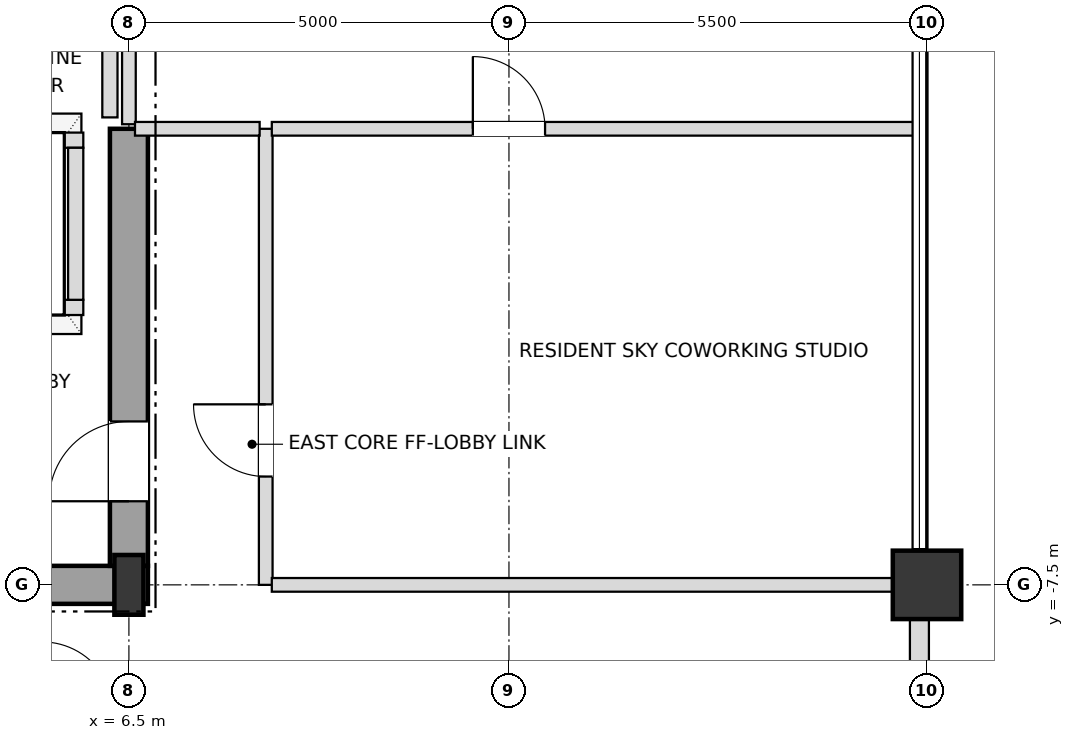
"""IFC4 building model, lengths in metres.
Left out: names, types, materials, properties, quantities, classifications, styles, units other than length and angle.
Written with IfcOpenShell. Run it as: python <this file> out.ifc"""

import sys

from ifc_helpers import new_model, si_unit, direction, frame, frame_2d, origin, origin_2d, place, context, subcontext, project, spatial, rectangle, i_section, extrude, element, fill, save


model = new_model("IFC4")
c1 = context("Model", 3, precision=1e-05, world=origin(), true_north=direction((0.0, 1.0)))
c2 = subcontext(c1, "Body", "Model", "MODEL_VIEW")
j1 = project(units=[si_unit("LENGTHUNIT", "METRE"), si_unit("PLANEANGLEUNIT", "RADIAN")], contexts=[c1])
p1 = place(None, origin())
s1 = spatial("IfcSite", under=j1, at=p1, CompositionType="ELEMENT")
p2 = place(p1, origin())
s2 = spatial("IfcBuilding", under=s1, at=p2, CompositionType="ELEMENT")
p3 = place(p2, frame((0.0, 0.0, 297.9)))
s3 = spatial("IfcBuildingStorey", under=s2, at=p3, CompositionType="ELEMENT", Elevation=297.9)
p4 = place(p3, frame((6.5, -7.5, 0.0), z_axis=(0.0, 0.0, 1.0), x_axis=(1.0, 0.0, 0.0)))
e1 = element("IfcColumn", 1, at=p4, inside=s3, PredefinedType="COLUMN", context=c2, shape_type="SweptSolid", body=[
    extrude(i_section(OverallWidth=0.382, OverallDepth=0.786, WebThickness=0.02, FlangeThickness=0.033, at=origin_2d()), origin(), (0.0, 0.0, 1.0), 3.6),
])
p5 = place(p3, frame((17.0, -7.5, 0.0), z_axis=(0.0, 0.0, 1.0), x_axis=(1.0, 0.0, 0.0)))
e2 = element("IfcColumn", 2, at=p5, inside=s3, PredefinedType="USERDEFINED", context=c2, shape_type="SweptSolid", body=[
    extrude(rectangle(XDim=0.9, YDim=0.9, at=origin_2d()), origin(), (0.0, 0.0, 1.0), 3.6),
])
p6 = place(p3, frame((16.9, -12.555, 0.0), z_axis=(0.0, 0.0, 1.0), x_axis=(0.0, 1.0, 0.0)))
e3 = element("IfcWall", 3, at=p6, inside=s3, PredefinedType="SOLIDWALL", context=c2, shape_type="SweptSolid", body=[
    extrude(rectangle(XDim=4.61, YDim=0.25, at=frame_2d((2.305, 0.0))), origin(), (0.0, 0.0, 1.0), 2.748),
])
p7 = place(p6, frame((1.405, 0.0, 0.72)))
e4 = element("IfcOpeningElement", 4, at=p7, cuts=e3, PredefinedType="OPENING", context=c2, shape_type="SweptSolid", body=[
    extrude(rectangle(XDim=1.8, YDim=1.68, at=frame_2d((0.9, 0.84))), frame((0.0, 0.135, 0.0), z_axis=(0.0, -1.0, 0.0), x_axis=(1.0, 0.0, 0.0)), (0.0, 0.0, 1.0), 0.27),
])
p8 = place(p3, frame((0.0, -7.5, 0.0), z_axis=(0.0, 0.0, 1.0), x_axis=(1.0, 0.0, 0.0)))
e5 = element("IfcWall", 5, at=p8, inside=s3, PredefinedType="SHEAR", context=c2, shape_type="SweptSolid", body=[
    extrude(rectangle(XDim=6.75, YDim=0.5, at=frame_2d((3.375, 0.0))), origin(), (0.0, 0.0, 1.0), 3.38),
])
p9 = place(p3, frame((6.5, -7.25, 0.0), z_axis=(0.0, 0.0, 1.0), x_axis=(0.0, 1.0, 0.0)))
e6 = element("IfcWall", 6, at=p9, inside=s3, PredefinedType="SHEAR", context=c2, shape_type="SweptSolid", body=[
    extrude(rectangle(XDim=5.75, YDim=0.5, at=frame_2d((2.875, 0.0))), origin(), (0.0, 0.0, 1.0), 3.38),
])
p10 = place(p9, frame((0.85, 0.0, 0.0)))
e7 = element("IfcOpeningElement", 7, at=p10, cuts=e6, PredefinedType="OPENING", context=c2, shape_type="SweptSolid", body=[
    extrude(rectangle(XDim=1.05, YDim=2.15, at=frame_2d((0.525, 1.075))), frame((0.0, 0.26, 0.0), z_axis=(0.0, -1.0, 0.0), x_axis=(1.0, 0.0, 0.0)), (0.0, 0.0, 1.0), 0.52),
])
p11 = place(p3, frame((1.8, -3.85, 0.0), z_axis=(0.0, 0.0, 1.0), x_axis=(1.0, 0.0, 0.0)))
e8 = element("IfcWall", 8, at=p11, inside=s3, PredefinedType="SOLIDWALL", context=c2, shape_type="SweptSolid", body=[
    extrude(rectangle(XDim=4.1, YDim=0.2, at=frame_2d((2.05, 0.0))), origin(), (0.0, 0.0, 1.0), 3.38),
])
p12 = place(p11, frame((0.45, 0.0, 0.0)))
e9 = element("IfcOpeningElement", 9, at=p12, cuts=e8, PredefinedType="OPENING", context=c2, shape_type="SweptSolid", body=[
    extrude(rectangle(XDim=1.2, YDim=2.2, at=frame_2d((0.6, 1.1))), frame((0.0, 0.11, 0.0), z_axis=(0.0, -1.0, 0.0), x_axis=(1.0, 0.0, 0.0)), (0.0, 0.0, 1.0), 0.22),
])
p13 = place(p11, frame((2.45, 0.0, 0.0)))
e10 = element("IfcOpeningElement", 10, at=p13, cuts=e8, PredefinedType="OPENING", context=c2, shape_type="SweptSolid", body=[
    extrude(rectangle(XDim=1.2, YDim=2.2, at=frame_2d((0.6, 1.1))), frame((0.0, 0.11, 0.0), z_axis=(0.0, -1.0, 0.0), x_axis=(1.0, 0.0, 0.0)), (0.0, 0.0, 1.0), 0.22),
])
p14 = place(p3, frame((1.8, -1.65, 0.0), z_axis=(0.0, 0.0, 1.0), x_axis=(1.0, 0.0, 0.0)))
e11 = element("IfcWall", 11, at=p14, inside=s3, PredefinedType="SOLIDWALL", context=c2, shape_type="SweptSolid", body=[
    extrude(rectangle(XDim=4.1, YDim=0.2, at=frame_2d((2.05, 0.0))), origin(), (0.0, 0.0, 1.0), 3.38),
])
p15 = place(p3, frame((5.8, -3.75, 0.0), z_axis=(0.0, 0.0, 1.0), x_axis=(0.0, 1.0, 0.0)))
e12 = element("IfcWall", 12, at=p15, inside=s3, PredefinedType="SOLIDWALL", context=c2, shape_type="SweptSolid", body=[
    extrude(rectangle(XDim=2.0, YDim=0.2, at=frame_2d((1.0, 0.0))), origin(), (0.0, 0.0, 1.0), 3.38),
])
p16 = place(p3, frame((6.25, -1.35, 0.0), z_axis=(0.0, 0.0, 1.0), x_axis=(0.0, 1.0, 0.0)))
e13 = element("IfcWall", 13, at=p16, inside=s3, PredefinedType="SOLIDWALL", context=c2, shape_type="SweptSolid", body=[
    extrude(rectangle(XDim=5.15, YDim=0.2, at=frame_2d((2.575, 0.0))), origin(), (0.0, 0.0, 1.0), 3.38),
])
p17 = place(p3, frame((6.5, -1.44, 0.0), z_axis=(0.0, 0.0, 1.0), x_axis=(0.0, 1.0, 0.0)))
e14 = element("IfcWall", 14, at=p17, inside=s3, PredefinedType="PARTITIONING", context=c2, shape_type="SweptSolid", body=[
    extrude(rectangle(XDim=5.33, YDim=0.18, at=frame_2d((2.665, 0.0))), origin(), (0.0, 0.0, 1.0), 2.826),
])
p18 = place(p3, frame((8.3, -7.5, 0.0), z_axis=(0.0, 0.0, 1.0), x_axis=(0.0, 1.0, 0.0)))
e15 = element("IfcWall", 15, at=p18, inside=s3, PredefinedType="PARTITIONING", context=c2, shape_type="SweptSolid", body=[
    extrude(rectangle(XDim=6.0, YDim=0.18, at=frame_2d((3.0, 0.0))), origin(), (0.0, 0.0, 1.0), 3.38),
])
p19 = place(p18, frame((1.425, 0.0, 0.0)))
e16 = element("IfcOpeningElement", 16, at=p19, cuts=e15, PredefinedType="OPENING", context=c2, shape_type="SweptSolid", body=[
    extrude(rectangle(XDim=0.95, YDim=2.15, at=frame_2d((0.475, 1.075))), frame((0.0, 0.1, 0.0), z_axis=(0.0, -1.0, 0.0), x_axis=(1.0, 0.0, 0.0)), (0.0, 0.0, 1.0), 0.2),
])
p20 = place(p3, frame((8.38, -7.5, 0.0), z_axis=(0.0, 0.0, 1.0), x_axis=(1.0, 0.0, 0.0)))
e17 = element("IfcWall", 17, at=p20, inside=s3, PredefinedType="PARTITIONING", context=c2, shape_type="SweptSolid", body=[
    extrude(rectangle(XDim=8.52, YDim=0.18, at=frame_2d((4.26, 0.0))), origin(), (0.0, 0.0, 1.0), 2.826),
])
p21 = place(p3, frame((6.58, -1.5, 0.0), z_axis=(0.0, 0.0, 1.0), x_axis=(1.0, 0.0, 0.0)))
e18 = element("IfcWall", 18, at=p21, inside=s3, PredefinedType="PARTITIONING", context=c2, shape_type="SweptSolid", body=[
    extrude(rectangle(XDim=1.64, YDim=0.18, at=frame_2d((0.82, 0.0))), origin(), (0.0, 0.0, 1.0), 3.38),
])
p22 = place(p3, frame((8.38, -1.5, 0.0), z_axis=(0.0, 0.0, 1.0), x_axis=(1.0, 0.0, 0.0)))
e19 = element("IfcWall", 19, at=p22, inside=s3, PredefinedType="PARTITIONING", context=c2, shape_type="SweptSolid", body=[
    extrude(rectangle(XDim=8.44, YDim=0.18, at=frame_2d((4.22, 0.0))), origin(), (0.0, 0.0, 1.0), 3.018),
])
p23 = place(p22, frame((2.645, 0.0, 0.0)))
e20 = element("IfcOpeningElement", 20, at=p23, cuts=e19, PredefinedType="OPENING", context=c2, shape_type="SweptSolid", body=[
    extrude(rectangle(XDim=0.95, YDim=2.15, at=frame_2d((0.475, 1.075))), frame((0.0, 0.1, 0.0), z_axis=(0.0, -1.0, 0.0), x_axis=(1.0, 0.0, 0.0)), (0.0, 0.0, 1.0), 0.2),
])
p24 = place(p10, origin())
e21 = element("IfcDoor", 21, at=p24, inside=s3, OperationType="SINGLE_SWING_LEFT", PredefinedType="DOOR", context=c2, shape_type="SweptSolid", body=[
    extrude(rectangle(XDim=1.05, YDim=2.15, at=frame_2d((0.525, 1.075))), frame((0.0, 0.025, 0.0), z_axis=(0.0, -1.0, 0.0), x_axis=(1.0, 0.0, 0.0)), (0.0, 0.0, 1.0), 0.05),
])
fill(e7, e21)
p25 = place(p19, origin())
e22 = element("IfcDoor", 22, at=p25, inside=s3, OperationType="SINGLE_SWING_RIGHT", PredefinedType="DOOR", context=c2, shape_type="SweptSolid", body=[
    extrude(rectangle(XDim=0.95, YDim=2.15, at=frame_2d((0.475, 1.075))), frame((0.0, 0.025, 0.0), z_axis=(0.0, -1.0, 0.0), x_axis=(1.0, 0.0, 0.0)), (0.0, 0.0, 1.0), 0.05),
])
fill(e16, e22)
p26 = place(p23, origin())
e23 = element("IfcDoor", 23, at=p26, inside=s3, OperationType="SINGLE_SWING_LEFT", PredefinedType="DOOR", context=c2, shape_type="SweptSolid", body=[
    extrude(rectangle(XDim=0.95, YDim=2.15, at=frame_2d((0.475, 1.075))), frame((0.0, 0.025, 0.0), z_axis=(0.0, -1.0, 0.0), x_axis=(1.0, 0.0, 0.0)), (0.0, 0.0, 1.0), 0.05),
])
fill(e20, e23)
save(model, sys.argv[1])
